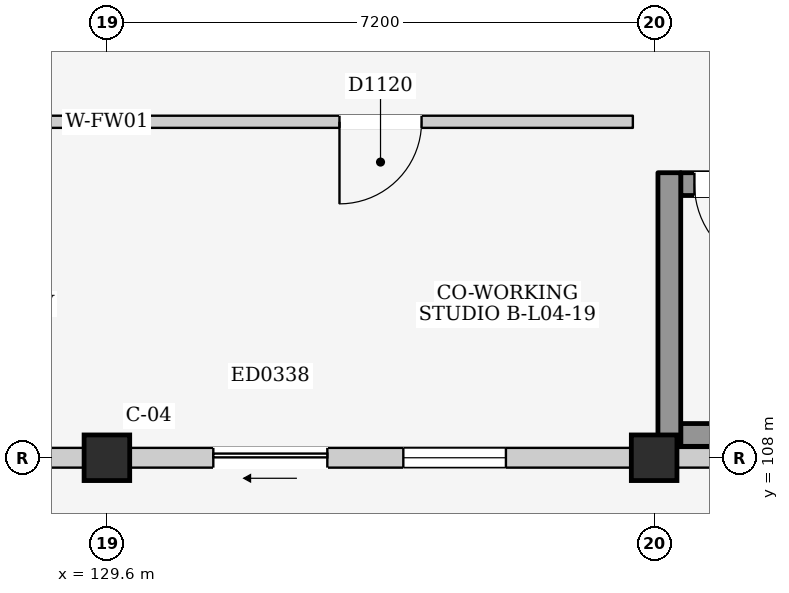
"""IFC4 building model, lengths in metres.
Left out: names, types, materials, properties, quantities, classifications, styles, units other than length and angle.
Written with IfcOpenShell. Run it as: python <this file> out.ifc"""

import sys

from ifc_helpers import new_model, si_unit, direction, frame, frame_2d, origin, origin_2d, place, context, subcontext, project, spatial, rectangle, extrude, element, fill, save


model = new_model("IFC4")
c1 = context("Model", 3, precision=1e-05, world=origin(), true_north=direction((0.0, 1.0)))
c2 = subcontext(c1, "Body", "Model", "MODEL_VIEW")
j1 = project(units=[si_unit("LENGTHUNIT", "METRE"), si_unit("PLANEANGLEUNIT", "RADIAN")], contexts=[c1])
p1 = place(None, origin())
s1 = spatial("IfcSite", under=j1, at=p1, CompositionType="ELEMENT")
p2 = place(p1, origin())
s2 = spatial("IfcBuilding", under=s1, at=p2, CompositionType="ELEMENT")
p3 = place(p2, frame((0.0, 0.0, 15.4)))
s3 = spatial("IfcBuildingStorey", under=s2, at=p3, CompositionType="ELEMENT", Elevation=15.4)
for number, where, z_axis, x_axis in (
    (1, (129.6, 108.0, 0.0), (0.0, 0.0, 1.0), (1.0, 0.0, 0.0)),
    (2, (136.8, 108.0, 0.0), (0.0, 0.0, 1.0), (1.0, 0.0, 0.0)),
):
    element("IfcColumn", number, at=place(p3, frame(where, z_axis=z_axis, x_axis=x_axis)), inside=s3, PredefinedType="COLUMN", context=c2, shape_type="SweptSolid", body=[
        extrude(rectangle(XDim=0.6, YDim=0.6, at=origin_2d()), origin(), (0.0, 0.0, 1.0), 3.2),
    ])
p4 = place(p3, frame((122.7, 108.0, 0.0), z_axis=(0.0, 0.0, 1.0), x_axis=(1.0, 0.0, 0.0)))
e3 = element("IfcWall", 3, at=p4, inside=s3, PredefinedType="ELEMENTEDWALL", context=c2, shape_type="SweptSolid", body=[
    extrude(rectangle(XDim=6.6, YDim=0.26, at=frame_2d((3.3, 0.0))), origin(), (0.0, 0.0, 1.0), 2.335),
])
p5 = place(p4, frame((1.1, 0.0, 0.0)))
e4 = element("IfcOpeningElement", 4, at=p5, cuts=e3, PredefinedType="OPENING", context=c2, shape_type="SweptSolid", body=[
    extrude(rectangle(XDim=1.5, YDim=2.12, at=frame_2d((0.75, 1.06))), frame((0.0, 0.145, 0.0), z_axis=(0.0, -1.0, 0.0), x_axis=(1.0, 0.0, 0.0)), (0.0, 0.0, 1.0), 0.29),
])
p6 = place(p4, frame((3.6, 0.0, 0.725)))
e5 = element("IfcOpeningElement", 5, at=p6, cuts=e3, PredefinedType="OPENING", context=c2, shape_type="SweptSolid", body=[
    extrude(rectangle(XDim=1.35, YDim=1.5, at=frame_2d((0.675, 0.75))), frame((0.0, 0.145, 0.0), z_axis=(0.0, -1.0, 0.0), x_axis=(1.0, 0.0, 0.0)), (0.0, 0.0, 1.0), 0.29),
])
p7 = place(p3, frame((129.9, 108.0, 0.0), z_axis=(0.0, 0.0, 1.0), x_axis=(1.0, 0.0, 0.0)))
e6 = element("IfcWall", 6, at=p7, inside=s3, PredefinedType="ELEMENTEDWALL", context=c2, shape_type="SweptSolid", body=[
    extrude(rectangle(XDim=6.6, YDim=0.26, at=frame_2d((3.3, 0.0))), origin(), (0.0, 0.0, 1.0), 2.335),
])
p8 = place(p7, frame((1.1, 0.0, 0.0)))
e7 = element("IfcOpeningElement", 7, at=p8, cuts=e6, PredefinedType="OPENING", context=c2, shape_type="SweptSolid", body=[
    extrude(rectangle(XDim=1.5, YDim=2.12, at=frame_2d((0.75, 1.06))), frame((0.0, 0.145, 0.0), z_axis=(0.0, -1.0, 0.0), x_axis=(1.0, 0.0, 0.0)), (0.0, 0.0, 1.0), 0.29),
])
p9 = place(p7, frame((3.6, 0.0, 0.725)))
e8 = element("IfcOpeningElement", 8, at=p9, cuts=e6, PredefinedType="OPENING", context=c2, shape_type="SweptSolid", body=[
    extrude(rectangle(XDim=1.35, YDim=1.5, at=frame_2d((0.675, 0.75))), frame((0.0, 0.145, 0.0), z_axis=(0.0, -1.0, 0.0), x_axis=(1.0, 0.0, 0.0)), (0.0, 0.0, 1.0), 0.29),
])
p10 = place(p3, frame((137.1, 108.0, 0.0), z_axis=(0.0, 0.0, 1.0), x_axis=(1.0, 0.0, 0.0)))
e9 = element("IfcWall", 9, at=p10, inside=s3, PredefinedType="ELEMENTEDWALL", context=c2, shape_type="SweptSolid", body=[
    extrude(rectangle(XDim=6.6, YDim=0.26, at=frame_2d((3.3, 0.0))), origin(), (0.0, 0.0, 1.0), 2.335),
])
p11 = place(p10, frame((2.8, 0.0, 1.2)))
e10 = element("IfcOpeningElement", 10, at=p11, cuts=e9, PredefinedType="OPENING", context=c2, shape_type="SweptSolid", body=[
    extrude(rectangle(XDim=1.0, YDim=0.9, at=frame_2d((0.5, 0.45))), frame((0.0, 0.145, 0.0), z_axis=(0.0, -1.0, 0.0), x_axis=(1.0, 0.0, 0.0)), (0.0, 0.0, 1.0), 0.29),
])
p12 = place(p3, frame((137.15, 108.3, 0.0), z_axis=(0.0, 0.0, 1.0), x_axis=(1.0, 0.0, 0.0)))
e11 = element("IfcWall", 11, at=p12, inside=s3, PredefinedType="SHEAR", context=c2, shape_type="SweptSolid", body=[
    extrude(rectangle(XDim=6.5, YDim=0.3, at=frame_2d((3.25, 0.0))), origin(), (0.0, 0.0, 1.0), 2.95),
])
p13 = place(p3, frame((137.15, 111.6, 0.0), z_axis=(0.0, 0.0, 1.0), x_axis=(1.0, 0.0, 0.0)))
e12 = element("IfcWall", 12, at=p13, inside=s3, PredefinedType="SHEAR", context=c2, shape_type="SweptSolid", body=[
    extrude(rectangle(XDim=6.5, YDim=0.3, at=frame_2d((3.25, 0.0))), origin(), (0.0, 0.0, 1.0), 2.95),
])
p14 = place(p13, frame((0.18, 0.0, 0.0)))
e13 = element("IfcOpeningElement", 13, at=p14, cuts=e12, PredefinedType="OPENING", context=c2, shape_type="SweptSolid", body=[
    extrude(rectangle(XDim=1.15, YDim=2.2, at=frame_2d((0.575, 1.1))), frame((0.0, 0.165, 0.0), z_axis=(0.0, -1.0, 0.0), x_axis=(1.0, 0.0, 0.0)), (0.0, 0.0, 1.0), 0.33),
])
p15 = place(p3, frame((137.0, 108.15, 0.0), z_axis=(0.0, 0.0, 1.0), x_axis=(0.0, 1.0, 0.0)))
e14 = element("IfcWall", 14, at=p15, inside=s3, PredefinedType="SHEAR", context=c2, shape_type="SweptSolid", body=[
    extrude(rectangle(XDim=3.6, YDim=0.3, at=frame_2d((1.8, 0.0))), origin(), (0.0, 0.0, 1.0), 2.95),
])
p16 = place(p3, frame((122.68, 112.42, 0.0), z_axis=(0.0, 0.0, 1.0), x_axis=(1.0, 0.0, 0.0)))
e15 = element("IfcWall", 15, at=p16, inside=s3, PredefinedType="PARTITIONING", context=c2, shape_type="SweptSolid", body=[
    extrude(rectangle(XDim=6.64, YDim=0.16, at=frame_2d((3.32, 0.0))), origin(), (0.0, 0.0, 1.0), 2.95),
])
p17 = place(p16, frame((2.78, 0.0, 0.0)))
e16 = element("IfcOpeningElement", 16, at=p17, cuts=e15, PredefinedType="OPENING", context=c2, shape_type="SweptSolid", body=[
    extrude(rectangle(XDim=1.08, YDim=2.22, at=frame_2d((0.54, 1.11))), frame((0.0, 0.095, 0.0), z_axis=(0.0, -1.0, 0.0), x_axis=(1.0, 0.0, 0.0)), (0.0, 0.0, 1.0), 0.19),
])
p18 = place(p3, frame((129.88, 112.42, 0.0), z_axis=(0.0, 0.0, 1.0), x_axis=(1.0, 0.0, 0.0)))
e17 = element("IfcWall", 17, at=p18, inside=s3, PredefinedType="PARTITIONING", context=c2, shape_type="SweptSolid", body=[
    extrude(rectangle(XDim=6.64, YDim=0.16, at=frame_2d((3.32, 0.0))), origin(), (0.0, 0.0, 1.0), 2.95),
])
p19 = place(p18, frame((2.78, 0.0, 0.0)))
e18 = element("IfcOpeningElement", 18, at=p19, cuts=e17, PredefinedType="OPENING", context=c2, shape_type="SweptSolid", body=[
    extrude(rectangle(XDim=1.08, YDim=2.22, at=frame_2d((0.54, 1.11))), frame((0.0, 0.095, 0.0), z_axis=(0.0, -1.0, 0.0), x_axis=(1.0, 0.0, 0.0)), (0.0, 0.0, 1.0), 0.19),
])
p20 = place(p8, frame((1.5, 0.0, 0.0), z_axis=(0.0, 0.0, 1.0), x_axis=(-1.0, 0.0, 0.0)))
e19 = element("IfcDoor", 19, at=p20, inside=s3, OperationType="SLIDING_TO_LEFT", PredefinedType="DOOR", context=c2, shape_type="SweptSolid", body=[
    extrude(rectangle(XDim=1.5, YDim=2.12, at=frame_2d((0.75, 1.06))), frame((0.0, 0.025, 0.0), z_axis=(0.0, -1.0, 0.0), x_axis=(1.0, 0.0, 0.0)), (0.0, 0.0, 1.0), 0.05),
])
fill(e7, e19)
p21 = place(p9, origin())
e20 = element("IfcWindow", 20, at=p21, inside=s3, PartitioningType="SINGLE_PANEL", PredefinedType="WINDOW", context=c2, shape_type="SweptSolid", body=[
    extrude(rectangle(XDim=1.35, YDim=1.5, at=frame_2d((0.675, 0.75))), frame((0.0, 0.03, 0.0), z_axis=(0.0, -1.0, 0.0), x_axis=(1.0, 0.0, 0.0)), (0.0, 0.0, 1.0), 0.06),
])
fill(e8, e20)
p22 = place(p14, frame((1.15, 0.0, 0.0), z_axis=(0.0, 0.0, 1.0), x_axis=(-1.0, 0.0, 0.0)))
e21 = element("IfcDoor", 21, at=p22, inside=s3, OperationType="SINGLE_SWING_LEFT", PredefinedType="DOOR", context=c2, shape_type="SweptSolid", body=[
    extrude(rectangle(XDim=1.15, YDim=2.2, at=frame_2d((0.575, 1.1))), frame((0.0, 0.025, 0.0), z_axis=(0.0, -1.0, 0.0), x_axis=(1.0, 0.0, 0.0)), (0.0, 0.0, 1.0), 0.05),
])
fill(e13, e21)
p23 = place(p19, frame((1.08, 0.0, 0.0), z_axis=(0.0, 0.0, 1.0), x_axis=(-1.0, 0.0, 0.0)))
e22 = element("IfcDoor", 22, at=p23, inside=s3, OperationType="SINGLE_SWING_RIGHT", PredefinedType="DOOR", context=c2, shape_type="SweptSolid", body=[
    extrude(rectangle(XDim=1.08, YDim=2.22, at=frame_2d((0.54, 1.11))), frame((0.0, 0.025, 0.0), z_axis=(0.0, -1.0, 0.0), x_axis=(1.0, 0.0, 0.0)), (0.0, 0.0, 1.0), 0.05),
])
fill(e18, e22)
save(model, sys.argv[1])
